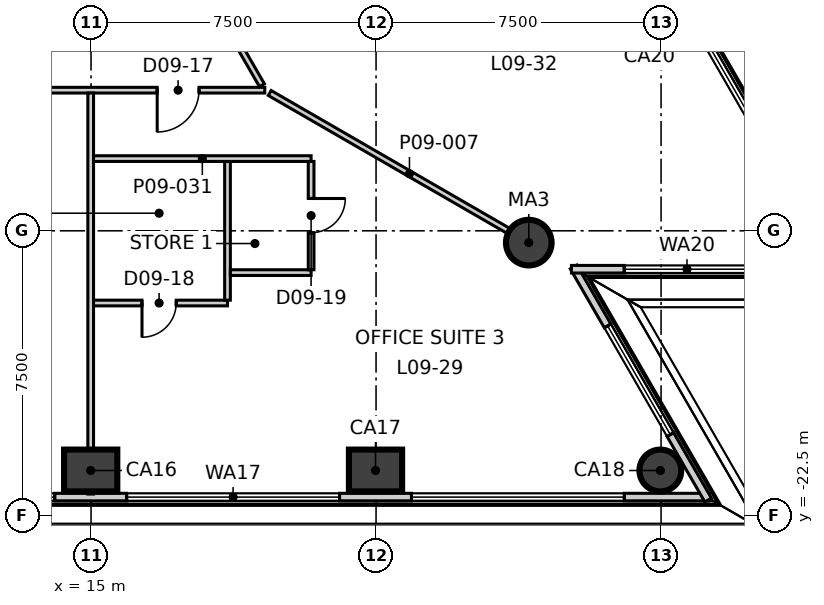
"""IFC4 building model, lengths in metres.
Left out: names, types, materials, properties, quantities, classifications, styles, units other than length and angle.
Written with IfcOpenShell. Run it as: python <this file> out.ifc"""

import sys

from ifc_helpers import new_model, si_unit, direction, frame, frame_2d, origin, origin_2d, place, context, subcontext, project, spatial, rectangle, circle, extrude, element, fill, save


model = new_model("IFC4")
c1 = context("Model", 3, precision=1e-05, world=origin(), true_north=direction((0.0, 1.0)))
c2 = subcontext(c1, "Body", "Model", "MODEL_VIEW")
j1 = project(units=[si_unit("LENGTHUNIT", "METRE"), si_unit("PLANEANGLEUNIT", "RADIAN")], contexts=[c1])
p1 = place(None, origin())
s1 = spatial("IfcSite", under=j1, at=p1, CompositionType="ELEMENT")
p2 = place(p1, origin())
s2 = spatial("IfcBuilding", under=s1, at=p2, CompositionType="ELEMENT")
p3 = place(p2, frame((0.0, 0.0, 47.3)))
s3 = spatial("IfcBuildingStorey", under=s2, at=p3, CompositionType="ELEMENT", Elevation=47.3)
for number, where, z_axis, x_axis in (
    (1, (14.991, -21.307, -0.3), (0.0, 0.0, 1.0), (1.0, 0.0, 0.0)),
    (2, (22.486, -21.307, -0.3), (0.0, 0.0, 1.0), (1.0, 0.0, 0.0)),
):
    element("IfcColumn", number, at=place(p3, frame(where, z_axis=z_axis, x_axis=x_axis)), inside=s3, PredefinedType="COLUMN", context=c2, shape_type="SweptSolid", body=[
        extrude(rectangle(XDim=1.4, YDim=1.1, at=origin_2d()), origin(), (0.0, 0.0, 1.0), 4.0),
    ])
p4 = place(p3, frame((29.981, -21.307, -0.3), z_axis=(0.0, 0.0, 1.0), x_axis=(1.0, 0.0, 0.0)))
e3 = element("IfcColumn", 3, at=p4, inside=s3, PredefinedType="COLUMN", context=c2, shape_type="SweptSolid", body=[
    extrude(circle(Radius=0.55, at=origin_2d()), origin(), (0.0, 0.0, 1.0), 4.0),
])
p5 = place(p3, frame((26.519, -15.311, -0.3), z_axis=(0.0, 0.0, 1.0), x_axis=(1.0, 0.0, 0.0)))
e4 = element("IfcColumn", 4, at=p5, inside=s3, PredefinedType="COLUMN", context=c2, shape_type="SweptSolid", body=[
    extrude(circle(Radius=0.6, at=origin_2d()), origin(), (0.0, 0.0, 1.0), 4.0),
])
p6 = place(p3, frame((-31.284, -22.007, 0.0), z_axis=(0.0, 0.0, 1.0), x_axis=(1.0, 0.0, 0.0)))
e5 = element("IfcWall", 5, at=p6, inside=s3, PredefinedType="ELEMENTEDWALL", context=c2, shape_type="SweptSolid", body=[
    extrude(rectangle(XDim=62.548, YDim=0.2, at=frame_2d((31.274, 0.0))), origin(), (0.0, 0.0, 1.0), 3.7),
])
p7 = place(p6, frame((2.251, 0.0, 0.9)))
e6 = element("IfcOpeningElement", 6, at=p7, cuts=e5, PredefinedType="OPENING", context=c2, shape_type="SweptSolid", body=[
    extrude(rectangle(XDim=5.6, YDim=2.5, at=frame_2d((2.8, 1.25))), frame((0.0, 0.11, 0.0), z_axis=(0.0, -1.0, 0.0), x_axis=(1.0, 0.0, 0.0)), (0.0, 0.0, 1.0), 0.22),
])
p8 = place(p6, frame((9.746, 0.0, 0.9)))
e7 = element("IfcOpeningElement", 7, at=p8, cuts=e5, PredefinedType="OPENING", context=c2, shape_type="SweptSolid", body=[
    extrude(rectangle(XDim=5.6, YDim=2.5, at=frame_2d((2.8, 1.25))), frame((0.0, 0.11, 0.0), z_axis=(0.0, -1.0, 0.0), x_axis=(1.0, 0.0, 0.0)), (0.0, 0.0, 1.0), 0.22),
])
p9 = place(p6, frame((17.241, 0.0, 0.9)))
e8 = element("IfcOpeningElement", 8, at=p9, cuts=e5, PredefinedType="OPENING", context=c2, shape_type="SweptSolid", body=[
    extrude(rectangle(XDim=5.6, YDim=2.5, at=frame_2d((2.8, 1.25))), frame((0.0, 0.11, 0.0), z_axis=(0.0, -1.0, 0.0), x_axis=(1.0, 0.0, 0.0)), (0.0, 0.0, 1.0), 0.22),
])
p10 = place(p6, frame((24.736, 0.0, 0.9)))
e9 = element("IfcOpeningElement", 9, at=p10, cuts=e5, PredefinedType="OPENING", context=c2, shape_type="SweptSolid", body=[
    extrude(rectangle(XDim=5.6, YDim=2.5, at=frame_2d((2.8, 1.25))), frame((0.0, 0.11, 0.0), z_axis=(0.0, -1.0, 0.0), x_axis=(1.0, 0.0, 0.0)), (0.0, 0.0, 1.0), 0.22),
])
p11 = place(p6, frame((32.232, 0.0, 0.9)))
e10 = element("IfcOpeningElement", 10, at=p11, cuts=e5, PredefinedType="OPENING", context=c2, shape_type="SweptSolid", body=[
    extrude(rectangle(XDim=5.6, YDim=2.5, at=frame_2d((2.8, 1.25))), frame((0.0, 0.11, 0.0), z_axis=(0.0, -1.0, 0.0), x_axis=(1.0, 0.0, 0.0)), (0.0, 0.0, 1.0), 0.22),
])
p12 = place(p6, frame((39.727, 0.0, 0.9)))
e11 = element("IfcOpeningElement", 11, at=p12, cuts=e5, PredefinedType="OPENING", context=c2, shape_type="SweptSolid", body=[
    extrude(rectangle(XDim=5.6, YDim=2.5, at=frame_2d((2.8, 1.25))), frame((0.0, 0.11, 0.0), z_axis=(0.0, -1.0, 0.0), x_axis=(1.0, 0.0, 0.0)), (0.0, 0.0, 1.0), 0.22),
])
p13 = place(p6, frame((47.222, 0.0, 0.9)))
e12 = element("IfcOpeningElement", 12, at=p13, cuts=e5, PredefinedType="OPENING", context=c2, shape_type="SweptSolid", body=[
    extrude(rectangle(XDim=5.6, YDim=2.5, at=frame_2d((2.8, 1.25))), frame((0.0, 0.11, 0.0), z_axis=(0.0, -1.0, 0.0), x_axis=(1.0, 0.0, 0.0)), (0.0, 0.0, 1.0), 0.22),
])
p14 = place(p6, frame((54.717, 0.0, 0.9)))
e13 = element("IfcOpeningElement", 13, at=p14, cuts=e5, PredefinedType="OPENING", context=c2, shape_type="SweptSolid", body=[
    extrude(rectangle(XDim=5.6, YDim=2.5, at=frame_2d((2.8, 1.25))), frame((0.0, 0.11, 0.0), z_axis=(0.0, -1.0, 0.0), x_axis=(1.0, 0.0, 0.0)), (0.0, 0.0, 1.0), 0.22),
])
p15 = place(p3, frame((31.239, -22.085, 0.0), z_axis=(0.0, 0.0, 1.0), x_axis=(-0.499993928037, 0.866028909405, 0.0)))
e14 = element("IfcWall", 14, at=p15, inside=s3, PredefinedType="ELEMENTEDWALL", context=c2, shape_type="SweptSolid", body=[
    extrude(rectangle(XDim=7.084, YDim=0.2, at=frame_2d((3.542, 0.0))), origin(), (0.0, 0.0, 1.0), 3.7),
])
p16 = place(p15, frame((1.99, 0.0, 0.9)))
e15 = element("IfcOpeningElement", 15, at=p16, cuts=e14, PredefinedType="OPENING", context=c2, shape_type="SweptSolid", body=[
    extrude(rectangle(XDim=3.3, YDim=2.5, at=frame_2d((1.65, 1.25))), frame((0.0, 0.11, 0.0), z_axis=(0.0, -1.0, 0.0), x_axis=(1.0, 0.0, 0.0)), (0.0, 0.0, 1.0), 0.22),
])
p17 = place(p3, frame((27.642, -16.011, 0.0), z_axis=(0.0, 0.0, 1.0), x_axis=(1.0, 0.0, 0.0)))
e16 = element("IfcWall", 16, at=p17, inside=s3, PredefinedType="ELEMENTEDWALL", context=c2, shape_type="SweptSolid", body=[
    extrude(rectangle(XDim=7.084, YDim=0.2, at=frame_2d((3.542, 0.0))), origin(), (0.0, 0.0, 1.0), 3.7),
])
p18 = place(p17, frame((1.39, 0.0, 0.9)))
e17 = element("IfcOpeningElement", 17, at=p18, cuts=e16, PredefinedType="OPENING", context=c2, shape_type="SweptSolid", body=[
    extrude(rectangle(XDim=3.3, YDim=2.5, at=frame_2d((1.65, 1.25))), frame((0.0, 0.11, 0.0), z_axis=(0.0, -1.0, 0.0), x_axis=(1.0, 0.0, 0.0)), (0.0, 0.0, 1.0), 0.22),
])
p19 = place(p3, frame((34.701, -16.089, 0.0), z_axis=(0.0, 0.0, 1.0), x_axis=(-0.499998722828, 0.866026141159, 0.0)))
e18 = element("IfcWall", 18, at=p19, inside=s3, PredefinedType="ELEMENTEDWALL", context=c2, shape_type="SweptSolid", body=[
    extrude(rectangle(XDim=62.548, YDim=0.2, at=frame_2d((31.274, 0.0))), origin(), (0.0, 0.0, 1.0), 3.7),
])
p20 = place(p19, frame((2.25, 0.0, 0.9)))
e19 = element("IfcOpeningElement", 19, at=p20, cuts=e18, PredefinedType="OPENING", context=c2, shape_type="SweptSolid", body=[
    extrude(rectangle(XDim=5.6, YDim=2.5, at=frame_2d((2.8, 1.25))), frame((0.0, 0.11, 0.0), z_axis=(0.0, -1.0, 0.0), x_axis=(1.0, 0.0, 0.0)), (0.0, 0.0, 1.0), 0.22),
])
p21 = place(p19, frame((9.746, 0.0, 0.9)))
e20 = element("IfcOpeningElement", 20, at=p21, cuts=e18, PredefinedType="OPENING", context=c2, shape_type="SweptSolid", body=[
    extrude(rectangle(XDim=5.6, YDim=2.5, at=frame_2d((2.8, 1.25))), frame((0.0, 0.11, 0.0), z_axis=(0.0, -1.0, 0.0), x_axis=(1.0, 0.0, 0.0)), (0.0, 0.0, 1.0), 0.22),
])
p22 = place(p19, frame((17.241, 0.0, 0.9)))
e21 = element("IfcOpeningElement", 21, at=p22, cuts=e18, PredefinedType="OPENING", context=c2, shape_type="SweptSolid", body=[
    extrude(rectangle(XDim=5.6, YDim=2.5, at=frame_2d((2.8, 1.25))), frame((0.0, 0.11, 0.0), z_axis=(0.0, -1.0, 0.0), x_axis=(1.0, 0.0, 0.0)), (0.0, 0.0, 1.0), 0.22),
])
p23 = place(p19, frame((24.736, 0.0, 0.9)))
e22 = element("IfcOpeningElement", 22, at=p23, cuts=e18, PredefinedType="OPENING", context=c2, shape_type="SweptSolid", body=[
    extrude(rectangle(XDim=5.6, YDim=2.5, at=frame_2d((2.8, 1.25))), frame((0.0, 0.11, 0.0), z_axis=(0.0, -1.0, 0.0), x_axis=(1.0, 0.0, 0.0)), (0.0, 0.0, 1.0), 0.22),
])
p24 = place(p19, frame((32.232, 0.0, 0.9)))
e23 = element("IfcOpeningElement", 23, at=p24, cuts=e18, PredefinedType="OPENING", context=c2, shape_type="SweptSolid", body=[
    extrude(rectangle(XDim=5.6, YDim=2.5, at=frame_2d((2.8, 1.25))), frame((0.0, 0.11, 0.0), z_axis=(0.0, -1.0, 0.0), x_axis=(1.0, 0.0, 0.0)), (0.0, 0.0, 1.0), 0.22),
])
p25 = place(p19, frame((39.727, 0.0, 0.9)))
e24 = element("IfcOpeningElement", 24, at=p25, cuts=e18, PredefinedType="OPENING", context=c2, shape_type="SweptSolid", body=[
    extrude(rectangle(XDim=5.6, YDim=2.5, at=frame_2d((2.8, 1.25))), frame((0.0, 0.11, 0.0), z_axis=(0.0, -1.0, 0.0), x_axis=(1.0, 0.0, 0.0)), (0.0, 0.0, 1.0), 0.22),
])
p26 = place(p19, frame((47.222, 0.0, 0.9)))
e25 = element("IfcOpeningElement", 25, at=p26, cuts=e18, PredefinedType="OPENING", context=c2, shape_type="SweptSolid", body=[
    extrude(rectangle(XDim=5.6, YDim=2.5, at=frame_2d((2.8, 1.25))), frame((0.0, 0.11, 0.0), z_axis=(0.0, -1.0, 0.0), x_axis=(1.0, 0.0, 0.0)), (0.0, 0.0, 1.0), 0.22),
])
p27 = place(p19, frame((54.717, 0.0, 0.9)))
e26 = element("IfcOpeningElement", 26, at=p27, cuts=e18, PredefinedType="OPENING", context=c2, shape_type="SweptSolid", body=[
    extrude(rectangle(XDim=5.6, YDim=2.5, at=frame_2d((2.8, 1.25))), frame((0.0, 0.11, 0.0), z_axis=(0.0, -1.0, 0.0), x_axis=(1.0, 0.0, 0.0)), (0.0, 0.0, 1.0), 0.22),
])
p28 = place(p3, frame((-19.422, -11.3, 0.0), z_axis=(0.0, 0.0, 1.0), x_axis=(1.0, 0.0, 0.0)))
e27 = element("IfcWall", 27, at=p28, inside=s3, PredefinedType="PARTITIONING", context=c2, shape_type="SweptSolid", body=[
    extrude(rectangle(XDim=38.994, YDim=0.15, at=frame_2d((19.497, 0.0))), origin(), (0.0, 0.0, 1.0), 3.7),
])
p29 = place(p28, frame((1.6, 0.0, 0.0)))
e28 = element("IfcOpeningElement", 28, at=p29, cuts=e27, PredefinedType="OPENING", context=c2, shape_type="SweptSolid", body=[
    extrude(rectangle(XDim=1.1, YDim=2.1, at=frame_2d((0.55, 1.05))), frame((0.0, 0.085, 0.0), z_axis=(0.0, -1.0, 0.0), x_axis=(1.0, 0.0, 0.0)), (0.0, 0.0, 1.0), 0.17),
])
p30 = place(p28, frame((7.682, 0.0, 0.0)))
e29 = element("IfcOpeningElement", 29, at=p30, cuts=e27, PredefinedType="OPENING", context=c2, shape_type="SweptSolid", body=[
    extrude(rectangle(XDim=1.0, YDim=2.1, at=frame_2d((0.5, 1.05))), frame((0.0, 0.085, 0.0), z_axis=(0.0, -1.0, 0.0), x_axis=(1.0, 0.0, 0.0)), (0.0, 0.0, 1.0), 0.17),
])
p31 = place(p28, frame((15.177, 0.0, 0.0)))
e30 = element("IfcOpeningElement", 30, at=p31, cuts=e27, PredefinedType="OPENING", context=c2, shape_type="SweptSolid", body=[
    extrude(rectangle(XDim=1.0, YDim=2.1, at=frame_2d((0.5, 1.05))), frame((0.0, 0.085, 0.0), z_axis=(0.0, -1.0, 0.0), x_axis=(1.0, 0.0, 0.0)), (0.0, 0.0, 1.0), 0.17),
])
p32 = place(p28, frame((29.372, 0.0, 0.0)))
e31 = element("IfcOpeningElement", 31, at=p32, cuts=e27, PredefinedType="OPENING", context=c2, shape_type="SweptSolid", body=[
    extrude(rectangle(XDim=1.1, YDim=2.1, at=frame_2d((0.55, 1.05))), frame((0.0, 0.085, 0.0), z_axis=(0.0, -1.0, 0.0), x_axis=(1.0, 0.0, 0.0)), (0.0, 0.0, 1.0), 0.17),
])
p33 = place(p28, frame((20.772, 0.0, 0.0)))
e32 = element("IfcOpeningElement", 32, at=p33, cuts=e27, PredefinedType="OPENING", context=c2, shape_type="SweptSolid", body=[
    extrude(rectangle(XDim=0.9, YDim=2.1, at=frame_2d((0.45, 1.05))), frame((0.0, 0.085, 0.0), z_axis=(0.0, -1.0, 0.0), x_axis=(1.0, 0.0, 0.0)), (0.0, 0.0, 1.0), 0.17),
])
p34 = place(p28, frame((23.772, 0.0, 0.0)))
e33 = element("IfcOpeningElement", 33, at=p34, cuts=e27, PredefinedType="OPENING", context=c2, shape_type="SweptSolid", body=[
    extrude(rectangle(XDim=0.9, YDim=2.1, at=frame_2d((0.45, 1.05))), frame((0.0, 0.085, 0.0), z_axis=(0.0, -1.0, 0.0), x_axis=(1.0, 0.0, 0.0)), (0.0, 0.0, 1.0), 0.17),
])
p35 = place(p28, frame((36.163, 0.0, 0.0)))
e34 = element("IfcOpeningElement", 34, at=p35, cuts=e27, PredefinedType="OPENING", context=c2, shape_type="SweptSolid", body=[
    extrude(rectangle(XDim=1.1, YDim=2.1, at=frame_2d((0.55, 1.05))), frame((0.0, 0.085, 0.0), z_axis=(0.0, -1.0, 0.0), x_axis=(1.0, 0.0, 0.0)), (0.0, 0.0, 1.0), 0.17),
])
p36 = place(p3, frame((19.702, -11.374, 0.0), z_axis=(0.0, 0.0, 1.0), x_axis=(0.865962467537, -0.500108992938, 0.0)))
e35 = element("IfcWall", 35, at=p36, inside=s3, PredefinedType="PARTITIONING", context=c2, shape_type="SweptSolid", body=[
    extrude(rectangle(XDim=8.492, YDim=0.15, at=frame_2d((4.246, 0.0))), origin(), (0.0, 0.0, 1.0), 3.1),
])
p37 = place(p3, frame((0.075, 22.47, 0.0), z_axis=(0.0, 0.0, 1.0), x_axis=(0.500002280369, -0.866024087209, 0.0)))
e36 = element("IfcWall", 36, at=p37, inside=s3, PredefinedType="PARTITIONING", context=c2, shape_type="SweptSolid", body=[
    extrude(rectangle(XDim=38.844, YDim=0.15, at=frame_2d((19.422, 0.0))), origin(), (0.0, 0.0, 1.0), 3.7),
])
p38 = place(p37, frame((36.244, 0.0, 0.0)))
e37 = element("IfcOpeningElement", 37, at=p38, cuts=e36, PredefinedType="OPENING", context=c2, shape_type="SweptSolid", body=[
    extrude(rectangle(XDim=1.0, YDim=2.1, at=frame_2d((0.5, 1.05))), frame((0.0, 0.085, 0.0), z_axis=(0.0, -1.0, 0.0), x_axis=(1.0, 0.0, 0.0)), (0.0, 0.0, 1.0), 0.17),
])
p39 = place(p37, frame((21.963, 0.0, 0.0)))
e38 = element("IfcOpeningElement", 38, at=p39, cuts=e36, PredefinedType="OPENING", context=c2, shape_type="SweptSolid", body=[
    extrude(rectangle(XDim=1.1, YDim=2.1, at=frame_2d((0.55, 1.05))), frame((0.0, 0.085, 0.0), z_axis=(0.0, -1.0, 0.0), x_axis=(1.0, 0.0, 0.0)), (0.0, 0.0, 1.0), 0.17),
])
p40 = place(p37, frame((32.363, 0.0, 0.0)))
e39 = element("IfcOpeningElement", 39, at=p40, cuts=e36, PredefinedType="OPENING", context=c2, shape_type="SweptSolid", body=[
    extrude(rectangle(XDim=0.9, YDim=2.1, at=frame_2d((0.45, 1.05))), frame((0.0, 0.085, 0.0), z_axis=(0.0, -1.0, 0.0), x_axis=(1.0, 0.0, 0.0)), (0.0, 0.0, 1.0), 0.17),
])
p41 = place(p37, frame((29.163, 0.0, 0.0)))
e40 = element("IfcOpeningElement", 40, at=p41, cuts=e36, PredefinedType="OPENING", context=c2, shape_type="SweptSolid", body=[
    extrude(rectangle(XDim=0.9, YDim=2.1, at=frame_2d((0.45, 1.05))), frame((0.0, 0.085, 0.0), z_axis=(0.0, -1.0, 0.0), x_axis=(1.0, 0.0, 0.0)), (0.0, 0.0, 1.0), 0.17),
])
p42 = place(p37, frame((26.263, 0.0, 0.0)))
e41 = element("IfcOpeningElement", 41, at=p42, cuts=e36, PredefinedType="OPENING", context=c2, shape_type="SweptSolid", body=[
    extrude(rectangle(XDim=1.0, YDim=2.1, at=frame_2d((0.5, 1.05))), frame((0.0, 0.085, 0.0), z_axis=(0.0, -1.0, 0.0), x_axis=(1.0, 0.0, 0.0)), (0.0, 0.0, 1.0), 0.17),
])
p43 = place(p37, frame((9.071, 0.0, 0.0)))
e42 = element("IfcOpeningElement", 42, at=p43, cuts=e36, PredefinedType="OPENING", context=c2, shape_type="SweptSolid", body=[
    extrude(rectangle(XDim=1.1, YDim=2.1, at=frame_2d((0.55, 1.05))), frame((0.0, 0.085, 0.0), z_axis=(0.0, -1.0, 0.0), x_axis=(1.0, 0.0, 0.0)), (0.0, 0.0, 1.0), 0.17),
])
p44 = place(p3, frame((14.991, -21.927, 0.0), z_axis=(0.0, 0.0, 1.0), x_axis=(0.0, 1.0, 0.0)))
e43 = element("IfcWall", 43, at=p44, inside=s3, PredefinedType="PARTITIONING", context=c2, shape_type="SweptSolid", body=[
    extrude(rectangle(XDim=10.552, YDim=0.15, at=frame_2d((5.276, 0.0))), origin(), (0.0, 0.0, 1.0), 3.7),
])
p45 = place(p3, frame((15.066, -16.9, 0.0), z_axis=(0.0, 0.0, 1.0), x_axis=(1.0, 0.0, 0.0)))
e44 = element("IfcWall", 44, at=p45, inside=s3, PredefinedType="PARTITIONING", context=c2, shape_type="SweptSolid", body=[
    extrude(rectangle(XDim=3.525, YDim=0.15, at=frame_2d((1.763, 0.0))), origin(), (0.0, 0.0, 1.0), 3.7),
])
p46 = place(p45, frame((1.275, 0.0, 0.0)))
e45 = element("IfcOpeningElement", 45, at=p46, cuts=e44, PredefinedType="OPENING", context=c2, shape_type="SweptSolid", body=[
    extrude(rectangle(XDim=0.9, YDim=2.1, at=frame_2d((0.45, 1.05))), frame((0.0, 0.085, 0.0), z_axis=(0.0, -1.0, 0.0), x_axis=(1.0, 0.0, 0.0)), (0.0, 0.0, 1.0), 0.17),
])
p47 = place(p3, frame((18.591, -16.825, 0.0), z_axis=(0.0, 0.0, 1.0), x_axis=(0.0, 1.0, 0.0)))
e46 = element("IfcWall", 46, at=p47, inside=s3, PredefinedType="PARTITIONING", context=c2, shape_type="SweptSolid", body=[
    extrude(rectangle(XDim=3.65, YDim=0.15, at=frame_2d((1.825, 0.0))), origin(), (0.0, 0.0, 1.0), 3.7),
])
p48 = place(p3, frame((15.066, -13.1, 0.0), z_axis=(0.0, 0.0, 1.0), x_axis=(1.0, 0.0, 0.0)))
e47 = element("IfcWall", 47, at=p48, inside=s3, PredefinedType="PARTITIONING", context=c2, shape_type="SweptSolid", body=[
    extrude(rectangle(XDim=5.725, YDim=0.15, at=frame_2d((2.863, 0.0))), origin(), (0.0, 0.0, 1.0), 3.7),
])
p49 = place(p3, frame((18.666, -16.1, 0.0), z_axis=(0.0, 0.0, 1.0), x_axis=(1.0, 0.0, 0.0)))
e48 = element("IfcWall", 48, at=p49, inside=s3, PredefinedType="PARTITIONING", context=c2, shape_type="SweptSolid", body=[
    extrude(rectangle(XDim=2.125, YDim=0.15, at=frame_2d((1.062, 0.0))), origin(), (0.0, 0.0, 1.0), 3.7),
])
p50 = place(p3, frame((20.791, -16.025, 0.0), z_axis=(0.0, 0.0, 1.0), x_axis=(0.0, 1.0, 0.0)))
e49 = element("IfcWall", 49, at=p50, inside=s3, PredefinedType="PARTITIONING", context=c2, shape_type="SweptSolid", body=[
    extrude(rectangle(XDim=2.85, YDim=0.15, at=frame_2d((1.425, 0.0))), origin(), (0.0, 0.0, 1.0), 3.7),
])
p51 = place(p50, frame((0.975, 0.0, 0.0)))
e50 = element("IfcOpeningElement", 50, at=p51, cuts=e49, PredefinedType="OPENING", context=c2, shape_type="SweptSolid", body=[
    extrude(rectangle(XDim=0.9, YDim=2.1, at=frame_2d((0.45, 1.05))), frame((0.0, 0.085, 0.0), z_axis=(0.0, -1.0, 0.0), x_axis=(1.0, 0.0, 0.0)), (0.0, 0.0, 1.0), 0.17),
])
p52 = place(p12, origin())
e51 = element("IfcWindow", 51, at=p52, inside=s3, PartitioningType="SINGLE_PANEL", PredefinedType="WINDOW", context=c2, shape_type="SweptSolid", body=[
    extrude(rectangle(XDim=5.6, YDim=2.5, at=frame_2d((2.8, 1.25))), frame((0.0, 0.03, 0.0), z_axis=(0.0, -1.0, 0.0), x_axis=(1.0, 0.0, 0.0)), (0.0, 0.0, 1.0), 0.06),
])
fill(e11, e51)
p53 = place(p13, origin())
e52 = element("IfcWindow", 52, at=p53, inside=s3, PartitioningType="SINGLE_PANEL", PredefinedType="WINDOW", context=c2, shape_type="SweptSolid", body=[
    extrude(rectangle(XDim=5.6, YDim=2.5, at=frame_2d((2.8, 1.25))), frame((0.0, 0.03, 0.0), z_axis=(0.0, -1.0, 0.0), x_axis=(1.0, 0.0, 0.0)), (0.0, 0.0, 1.0), 0.06),
])
fill(e12, e52)
p54 = place(p14, origin())
e53 = element("IfcWindow", 53, at=p54, inside=s3, PartitioningType="SINGLE_PANEL", PredefinedType="WINDOW", context=c2, shape_type="SweptSolid", body=[
    extrude(rectangle(XDim=5.6, YDim=2.5, at=frame_2d((2.8, 1.25))), frame((0.0, 0.03, 0.0), z_axis=(0.0, -1.0, 0.0), x_axis=(1.0, 0.0, 0.0)), (0.0, 0.0, 1.0), 0.06),
])
fill(e13, e53)
p55 = place(p16, origin())
e54 = element("IfcWindow", 54, at=p55, inside=s3, PartitioningType="SINGLE_PANEL", PredefinedType="WINDOW", context=c2, shape_type="SweptSolid", body=[
    extrude(rectangle(XDim=3.3, YDim=2.5, at=frame_2d((1.65, 1.25))), frame((0.0, 0.03, 0.0), z_axis=(0.0, -1.0, 0.0), x_axis=(1.0, 0.0, 0.0)), (0.0, 0.0, 1.0), 0.06),
])
fill(e15, e54)
p56 = place(p18, origin())
e55 = element("IfcWindow", 55, at=p56, inside=s3, PartitioningType="SINGLE_PANEL", PredefinedType="WINDOW", context=c2, shape_type="SweptSolid", body=[
    extrude(rectangle(XDim=3.3, YDim=2.5, at=frame_2d((1.65, 1.25))), frame((0.0, 0.03, 0.0), z_axis=(0.0, -1.0, 0.0), x_axis=(1.0, 0.0, 0.0)), (0.0, 0.0, 1.0), 0.06),
])
fill(e17, e55)
p57 = place(p20, origin())
e56 = element("IfcWindow", 56, at=p57, inside=s3, PartitioningType="SINGLE_PANEL", PredefinedType="WINDOW", context=c2, shape_type="SweptSolid", body=[
    extrude(rectangle(XDim=5.6, YDim=2.5, at=frame_2d((2.8, 1.25))), frame((0.0, 0.03, 0.0), z_axis=(0.0, -1.0, 0.0), x_axis=(1.0, 0.0, 0.0)), (0.0, 0.0, 1.0), 0.06),
])
fill(e19, e56)
p58 = place(p35, origin())
e57 = element("IfcDoor", 57, at=p58, inside=s3, OperationType="SINGLE_SWING_LEFT", PredefinedType="DOOR", context=c2, shape_type="SweptSolid", body=[
    extrude(rectangle(XDim=1.1, YDim=2.1, at=frame_2d((0.55, 1.05))), frame((0.0, 0.025, 0.0), z_axis=(0.0, -1.0, 0.0), x_axis=(1.0, 0.0, 0.0)), (0.0, 0.0, 1.0), 0.05),
])
fill(e34, e57)
p59 = place(p46, origin())
e58 = element("IfcDoor", 58, at=p59, inside=s3, OperationType="SINGLE_SWING_LEFT", PredefinedType="DOOR", context=c2, shape_type="SweptSolid", body=[
    extrude(rectangle(XDim=0.9, YDim=2.1, at=frame_2d((0.45, 1.05))), frame((0.0, 0.025, 0.0), z_axis=(0.0, -1.0, 0.0), x_axis=(1.0, 0.0, 0.0)), (0.0, 0.0, 1.0), 0.05),
])
fill(e45, e58)
p60 = place(p51, origin())
e59 = element("IfcDoor", 59, at=p60, inside=s3, OperationType="SINGLE_SWING_RIGHT", PredefinedType="DOOR", context=c2, shape_type="SweptSolid", body=[
    extrude(rectangle(XDim=0.9, YDim=2.1, at=frame_2d((0.45, 1.05))), frame((0.0, 0.025, 0.0), z_axis=(0.0, -1.0, 0.0), x_axis=(1.0, 0.0, 0.0)), (0.0, 0.0, 1.0), 0.05),
])
fill(e50, e59)
save(model, sys.argv[1])
